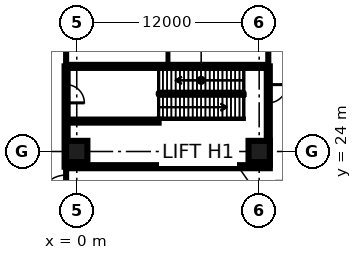
"""IFC4 building model, lengths in metres.
Left out: names, types, materials, properties, quantities, classifications, styles, units other than length and angle.
Written with IfcOpenShell. Run it as: python <this file> out.ifc"""

import sys

from ifc_helpers import new_model, si_unit, direction, frame, frame_2d, origin, origin_2d, place, context, subcontext, project, spatial, rectangle, extrude, element, fill, save


model = new_model("IFC4")
c1 = context("Model", 3, precision=1e-05, world=origin(), true_north=direction((0.0, 1.0)))
c2 = subcontext(c1, "Body", "Model", "MODEL_VIEW")
j1 = project(units=[si_unit("LENGTHUNIT", "METRE"), si_unit("PLANEANGLEUNIT", "RADIAN")], contexts=[c1])
p1 = place(None, origin())
s1 = spatial("IfcSite", under=j1, at=p1, CompositionType="ELEMENT")
p2 = place(p1, origin())
s2 = spatial("IfcBuilding", under=s1, at=p2, CompositionType="ELEMENT")
p3 = place(p2, origin())
s3 = spatial("IfcBuildingStorey", under=s2, at=p3, CompositionType="ELEMENT", Elevation=0.0)
for number, where, z_axis, x_axis in (
    (1, (0.0, 24.0, 0.0), (0.0, 0.0, 1.0), (1.0, 0.0, 0.0)),
    (2, (12.0, 24.0, 0.0), (0.0, 0.0, 1.0), (1.0, 0.0, 0.0)),
):
    element("IfcColumn", number, at=place(p3, frame(where, z_axis=z_axis, x_axis=x_axis)), inside=s3, PredefinedType="COLUMN", context=c2, shape_type="SweptSolid", body=[
        extrude(rectangle(XDim=1.4, YDim=1.4, at=origin_2d()), origin(), (0.0, 0.0, 1.0), 7.2),
    ])
p4 = place(p3, frame((-0.7, -0.6, 0.0), z_axis=(0.0, 0.0, 1.0), x_axis=(0.0, 1.0, 0.0)))
e3 = element("IfcWall", 3, at=p4, inside=s3, PredefinedType="PARTITIONING", context=c2, shape_type="SweptSolid", body=[
    extrude(rectangle(XDim=23.6, YDim=0.2, at=frame_2d((11.8, 0.0))), origin(), (0.0, 0.0, 1.0), 6.8),
])
p5 = place(p4, frame((21.25, 0.0, 0.0)))
e4 = element("IfcOpeningElement", 4, at=p5, cuts=e3, PredefinedType="OPENING", context=c2, shape_type="SweptSolid", body=[
    extrude(rectangle(XDim=1.8, YDim=2.1, at=frame_2d((0.9, 1.05))), frame((0.0, 0.11, 0.0), z_axis=(0.0, -1.0, 0.0), x_axis=(1.0, 0.0, 0.0)), (0.0, 0.0, 1.0), 0.22),
])
p6 = place(p4, frame((13.5, 0.0, 0.0)))
e5 = element("IfcOpeningElement", 5, at=p6, cuts=e3, PredefinedType="OPENING", context=c2, shape_type="SweptSolid", body=[
    extrude(rectangle(XDim=1.0, YDim=2.1, at=frame_2d((0.5, 1.05))), frame((0.0, 0.11, 0.0), z_axis=(0.0, -1.0, 0.0), x_axis=(1.0, 0.0, 0.0)), (0.0, 0.0, 1.0), 0.22),
])
p7 = place(p3, frame((-0.7, 23.0, 0.0), z_axis=(0.0, 0.0, 1.0), x_axis=(0.0, 1.0, 0.0)))
e6 = element("IfcWall", 6, at=p7, inside=s3, PredefinedType="SOLIDWALL", context=c2, shape_type="SweptSolid", body=[
    extrude(rectangle(XDim=6.6, YDim=0.2, at=frame_2d((3.3, 0.0))), origin(), (0.0, 0.0, 1.0), 6.8),
])
p8 = place(p7, frame((4.2, 0.0, 0.0)))
e7 = element("IfcOpeningElement", 7, at=p8, cuts=e6, PredefinedType="OPENING", context=c2, shape_type="SweptSolid", body=[
    extrude(rectangle(XDim=1.2, YDim=2.1, at=frame_2d((0.6, 1.05))), frame((0.0, 0.11, 0.0), z_axis=(0.0, -1.0, 0.0), x_axis=(1.0, 0.0, 0.0)), (0.0, 0.0, 1.0), 0.22),
])
p9 = place(p3, frame((-0.7, 29.6, 0.0), z_axis=(0.0, 0.0, 1.0), x_axis=(0.0, 1.0, 0.0)))
e8 = element("IfcWall", 8, at=p9, inside=s3, PredefinedType="PARTITIONING", context=c2, shape_type="SweptSolid", body=[
    extrude(rectangle(XDim=6.4, YDim=0.2, at=frame_2d((3.2, 0.0))), origin(), (0.0, 0.0, 1.0), 6.8),
])
p10 = place(p9, frame((2.65, 0.0, 0.0)))
e9 = element("IfcOpeningElement", 9, at=p10, cuts=e8, PredefinedType="OPENING", context=c2, shape_type="SweptSolid", body=[
    extrude(rectangle(XDim=1.0, YDim=2.1, at=frame_2d((0.5, 1.05))), frame((0.0, 0.11, 0.0), z_axis=(0.0, -1.0, 0.0), x_axis=(1.0, 0.0, 0.0)), (0.0, 0.0, 1.0), 0.22),
])
p11 = place(p3, frame((-0.6, 23.0, 0.0), z_axis=(0.0, 0.0, 1.0), x_axis=(1.0, 0.0, 0.0)))
e10 = element("IfcWall", 10, at=p11, inside=s3, PredefinedType="SOLIDWALL", context=c2, shape_type="SweptSolid", body=[
    extrude(rectangle(XDim=13.3, YDim=0.2, at=frame_2d((6.65, 0.0))), origin(), (0.0, 0.0, 1.0), 6.8),
])
p12 = place(p3, frame((-0.6, 29.6, 0.0), z_axis=(0.0, 0.0, 1.0), x_axis=(1.0, 0.0, 0.0)))
e11 = element("IfcWall", 11, at=p12, inside=s3, PredefinedType="SOLIDWALL", context=c2, shape_type="SweptSolid", body=[
    extrude(rectangle(XDim=13.1, YDim=0.2, at=frame_2d((6.55, 0.0))), origin(), (0.0, 0.0, 1.0), 6.8),
])
p13 = place(p3, frame((6.0, 29.7, 0.0), z_axis=(0.0, 0.0, 1.0), x_axis=(0.0, 1.0, 0.0)))
e12 = element("IfcWall", 12, at=p13, inside=s3, PredefinedType="PARTITIONING", context=c2, shape_type="SweptSolid", body=[
    extrude(rectangle(XDim=6.2, YDim=0.125, at=frame_2d((3.1, 0.0))), origin(), (0.0, 0.0, 1.0), 6.8),
])
p14 = place(p3, frame((12.6, 23.1, 0.0), z_axis=(0.0, 0.0, 1.0), x_axis=(0.0, 1.0, 0.0)))
e13 = element("IfcWall", 13, at=p14, inside=s3, PredefinedType="SOLIDWALL", context=c2, shape_type="SweptSolid", body=[
    extrude(rectangle(XDim=6.5, YDim=0.2, at=frame_2d((3.25, 0.0))), origin(), (0.0, 0.0, 1.0), 6.8),
])
p15 = place(p14, frame((4.1, 0.0, 0.0)))
e14 = element("IfcOpeningElement", 14, at=p15, cuts=e13, PredefinedType="OPENING", context=c2, shape_type="SweptSolid", body=[
    extrude(rectangle(XDim=1.2, YDim=2.1, at=frame_2d((0.6, 1.05))), frame((0.0, 0.11, 0.0), z_axis=(0.0, -1.0, 0.0), x_axis=(1.0, 0.0, 0.0)), (0.0, 0.0, 1.0), 0.22),
])
p16 = place(p3, frame((12.6, 29.6, 0.0), z_axis=(0.0, 0.0, 1.0), x_axis=(0.0, 1.0, 0.0)))
e15 = element("IfcWall", 15, at=p16, inside=s3, PredefinedType="PARTITIONING", context=c2, shape_type="SweptSolid", body=[
    extrude(rectangle(XDim=6.4, YDim=0.2, at=frame_2d((3.2, 0.0))), origin(), (0.0, 0.0, 1.0), 6.8),
])
p17 = place(p16, frame((2.75, 0.0, 0.0)))
e16 = element("IfcOpeningElement", 16, at=p17, cuts=e15, PredefinedType="OPENING", context=c2, shape_type="SweptSolid", body=[
    extrude(rectangle(XDim=1.0, YDim=2.1, at=frame_2d((0.5, 1.05))), frame((0.0, 0.11, 0.0), z_axis=(0.0, -1.0, 0.0), x_axis=(1.0, 0.0, 0.0)), (0.0, 0.0, 1.0), 0.22),
])
p18 = place(p3, frame((-0.6, 26.0, 0.0), z_axis=(0.0, 0.0, 1.0), x_axis=(1.0, 0.0, 0.0)))
e17 = element("IfcWall", 17, at=p18, inside=s3, PredefinedType="SOLIDWALL", context=c2, shape_type="SweptSolid", body=[
    extrude(rectangle(XDim=5.985, YDim=0.2, at=frame_2d((2.993, 0.0))), origin(), (0.0, 0.0, 1.0), 6.8),
])
p19 = place(p5, origin())
e18 = element("IfcDoor", 18, at=p19, inside=s3, OperationType="DOUBLE_DOOR_SINGLE_SWING", PredefinedType="DOOR", context=c2, shape_type="SweptSolid", body=[
    extrude(rectangle(XDim=1.8, YDim=2.1, at=frame_2d((0.9, 1.05))), frame((0.0, 0.025, 0.0), z_axis=(0.0, -1.0, 0.0), x_axis=(1.0, 0.0, 0.0)), (0.0, 0.0, 1.0), 0.05),
])
fill(e4, e18)
p20 = place(p15, origin())
e19 = element("IfcDoor", 19, at=p20, inside=s3, OperationType="SINGLE_SWING_RIGHT", PredefinedType="DOOR", context=c2, shape_type="SweptSolid", body=[
    extrude(rectangle(XDim=1.2, YDim=2.1, at=frame_2d((0.6, 1.05))), frame((0.0, 0.025, 0.0), z_axis=(0.0, -1.0, 0.0), x_axis=(1.0, 0.0, 0.0)), (0.0, 0.0, 1.0), 0.05),
])
fill(e14, e19)
p21 = place(p8, frame((1.2, 0.0, 0.0), z_axis=(0.0, 0.0, 1.0), x_axis=(-1.0, 0.0, 0.0)))
e20 = element("IfcDoor", 20, at=p21, inside=s3, OperationType="SINGLE_SWING_LEFT", PredefinedType="DOOR", context=c2, shape_type="SweptSolid", body=[
    extrude(rectangle(XDim=1.2, YDim=2.1, at=frame_2d((0.6, 1.05))), frame((0.0, 0.025, 0.0), z_axis=(0.0, -1.0, 0.0), x_axis=(1.0, 0.0, 0.0)), (0.0, 0.0, 1.0), 0.05),
])
fill(e7, e20)
save(model, sys.argv[1])
